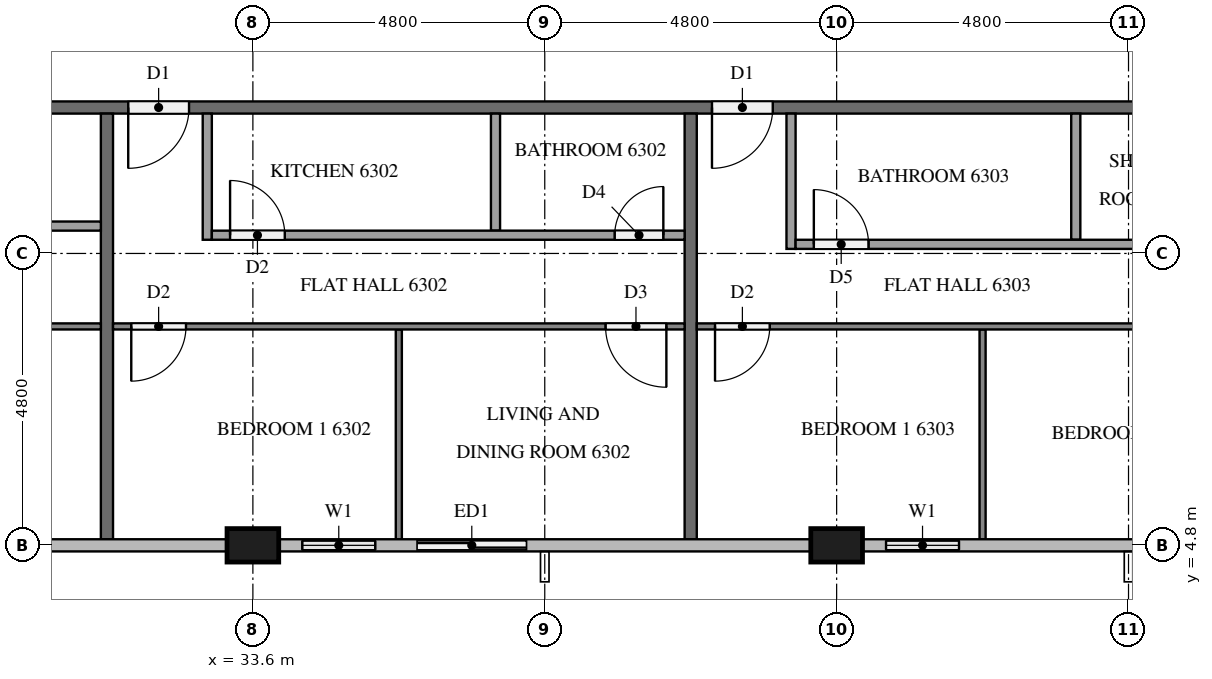
"""IFC4 building model, lengths in metres.
Left out: names, types, materials, properties, quantities, classifications, styles, units other than length and angle.
Written with IfcOpenShell. Run it as: python <this file> out.ifc"""

import sys

from ifc_helpers import new_model, si_unit, direction, frame, frame_2d, origin, origin_2d, place, context, subcontext, project, spatial, rectangle, extrude, element, fill, save


model = new_model("IFC4")
c1 = context("Model", 3, precision=1e-05, world=origin(), true_north=direction((0.0, 1.0)))
c2 = subcontext(c1, "Body", "Model", "MODEL_VIEW")
j1 = project(units=[si_unit("LENGTHUNIT", "METRE"), si_unit("PLANEANGLEUNIT", "RADIAN")], contexts=[c1])
p1 = place(None, origin())
s1 = spatial("IfcSite", under=j1, at=p1, CompositionType="ELEMENT")
p2 = place(p1, origin())
s2 = spatial("IfcBuilding", under=s1, at=p2, CompositionType="ELEMENT")
p3 = place(p2, frame((0.0, 0.0, 242.2)))
s3 = spatial("IfcBuildingStorey", under=s2, at=p3, CompositionType="ELEMENT", Elevation=242.2)
for number, where, z_axis, x_axis in (
    (1, (33.6, 4.8, 0.0), (0.0, 0.0, 1.0), (1.0, 0.0, 0.0)),
    (2, (43.2, 4.8, 0.0), (0.0, 0.0, 1.0), (1.0, 0.0, 0.0)),
):
    element("IfcColumn", number, at=place(p3, frame(where, z_axis=z_axis, x_axis=x_axis)), inside=s3, PredefinedType="COLUMN", context=c2, shape_type="SweptSolid", body=[
        extrude(rectangle(XDim=0.85, YDim=0.55, at=origin_2d()), origin(), (0.0, 0.0, 1.0), 3.2),
    ])
p4 = place(p3, frame((34.025, 4.8, 0.0), z_axis=(0.0, 0.0, 1.0), x_axis=(1.0, 0.0, 0.0)))
e3 = element("IfcWall", 3, at=p4, inside=s3, PredefinedType="SOLIDWALL", context=c2, shape_type="SweptSolid", body=[
    extrude(rectangle(XDim=4.375, YDim=0.15, at=frame_2d((2.188, 0.0))), origin(), (0.0, 0.0, 1.0), 3.2),
])
p5 = place(p4, frame((0.387, 0.0, 0.9)))
e4 = element("IfcOpeningElement", 4, at=p5, cuts=e3, PredefinedType="OPENING", context=c2, shape_type="SweptSolid", body=[
    extrude(rectangle(XDim=1.2, YDim=1.4, at=frame_2d((0.6, 0.7))), frame((0.0, 0.085, 0.0), z_axis=(0.0, -1.0, 0.0), x_axis=(1.0, 0.0, 0.0)), (0.0, 0.0, 1.0), 0.17),
])
p6 = place(p4, frame((2.275, 0.0, 0.0)))
e5 = element("IfcOpeningElement", 5, at=p6, cuts=e3, PredefinedType="OPENING", context=c2, shape_type="SweptSolid", body=[
    extrude(rectangle(XDim=1.8, YDim=2.4, at=frame_2d((0.9, 1.2))), frame((0.0, 0.085, 0.0), z_axis=(0.0, -1.0, 0.0), x_axis=(1.0, 0.0, 0.0)), (0.0, 0.0, 1.0), 0.17),
])
p7 = place(p3, frame((43.625, 4.8, 0.0), z_axis=(0.0, 0.0, 1.0), x_axis=(1.0, 0.0, 0.0)))
e6 = element("IfcWall", 6, at=p7, inside=s3, PredefinedType="SOLIDWALL", context=c2, shape_type="SweptSolid", body=[
    extrude(rectangle(XDim=1.975, YDim=0.15, at=frame_2d((0.988, 0.0))), origin(), (0.0, 0.0, 1.0), 3.2),
])
p8 = place(p7, frame((0.387, 0.0, 0.9)))
e7 = element("IfcOpeningElement", 7, at=p8, cuts=e6, PredefinedType="OPENING", context=c2, shape_type="SweptSolid", body=[
    extrude(rectangle(XDim=1.2, YDim=1.4, at=frame_2d((0.6, 0.7))), frame((0.0, 0.085, 0.0), z_axis=(0.0, -1.0, 0.0), x_axis=(1.0, 0.0, 0.0)), (0.0, 0.0, 1.0), 0.17),
])
p9 = place(p3, frame((50.5, 12.0, 0.0), z_axis=(0.0, 0.0, 1.0), x_axis=(-1.0, 0.0, 0.0)))
e8 = element("IfcWall", 8, at=p9, inside=s3, PredefinedType="PARTITIONING", context=c2, shape_type="SweptSolid", body=[
    extrude(rectangle(XDim=38.6, YDim=0.2, at=frame_2d((19.3, 0.0))), origin(), (0.0, 0.0, 1.0), 3.2),
])
p10 = place(p9, frame((37.1, 0.0, 0.0)))
e9 = element("IfcOpeningElement", 9, at=p10, cuts=e8, PredefinedType="OPENING", context=c2, shape_type="SweptSolid", body=[
    extrude(rectangle(XDim=1.1, YDim=2.1, at=frame_2d((0.55, 1.05))), frame((0.0, 0.11, 0.0), z_axis=(0.0, -1.0, 0.0), x_axis=(1.0, 0.0, 0.0)), (0.0, 0.0, 1.0), 0.22),
])
p11 = place(p9, frame((17.95, 0.0, 0.0)))
e10 = element("IfcOpeningElement", 10, at=p11, cuts=e8, PredefinedType="OPENING", context=c2, shape_type="SweptSolid", body=[
    extrude(rectangle(XDim=1.0, YDim=2.1, at=frame_2d((0.5, 1.05))), frame((0.0, 0.11, 0.0), z_axis=(0.0, -1.0, 0.0), x_axis=(1.0, 0.0, 0.0)), (0.0, 0.0, 1.0), 0.22),
])
p12 = place(p9, frame((8.35, 0.0, 0.0)))
e11 = element("IfcOpeningElement", 11, at=p12, cuts=e8, PredefinedType="OPENING", context=c2, shape_type="SweptSolid", body=[
    extrude(rectangle(XDim=1.0, YDim=2.1, at=frame_2d((0.5, 1.05))), frame((0.0, 0.11, 0.0), z_axis=(0.0, -1.0, 0.0), x_axis=(1.0, 0.0, 0.0)), (0.0, 0.0, 1.0), 0.22),
])
for number, where, z_axis, x_axis in (
    (12, (31.2, 11.9, 0.0), (0.0, 0.0, 1.0), (0.0, -1.0, 0.0)),
    (13, (40.8, 11.9, 0.0), (0.0, 0.0, 1.0), (0.0, -1.0, 0.0)),
):
    element("IfcWall", number, at=place(p3, frame(where, z_axis=z_axis, x_axis=x_axis)), inside=s3, PredefinedType="PARTITIONING", context=c2, shape_type="SweptSolid", body=[
        extrude(rectangle(XDim=7.0, YDim=0.2, at=frame_2d((3.5, 0.0))), origin(), (0.0, 0.0, 1.0), 3.2),
    ])
p13 = place(p3, frame((31.1, 8.4, 0.0), z_axis=(0.0, 0.0, 1.0), x_axis=(-1.0, 0.0, 0.0)))
e14 = element("IfcWall", 14, at=p13, inside=s3, PredefinedType="PARTITIONING", context=c2, shape_type="SweptSolid", body=[
    extrude(rectangle(XDim=19.0, YDim=0.1, at=frame_2d((9.5, 0.0))), origin(), (0.0, 0.0, 1.0), 3.2),
])
p14 = place(p13, frame((14.65, 0.0, 0.0)))
e15 = element("IfcOpeningElement", 15, at=p14, cuts=e14, PredefinedType="OPENING", context=c2, shape_type="SweptSolid", body=[
    extrude(rectangle(XDim=0.9, YDim=2.1, at=frame_2d((0.45, 1.05))), frame((0.0, 0.06, 0.0), z_axis=(0.0, -1.0, 0.0), x_axis=(1.0, 0.0, 0.0)), (0.0, 0.0, 1.0), 0.12),
])
p15 = place(p13, frame((12.95, 0.0, 0.0)))
e16 = element("IfcOpeningElement", 16, at=p15, cuts=e14, PredefinedType="OPENING", context=c2, shape_type="SweptSolid", body=[
    extrude(rectangle(XDim=1.0, YDim=2.1, at=frame_2d((0.5, 1.05))), frame((0.0, 0.06, 0.0), z_axis=(0.0, -1.0, 0.0), x_axis=(1.0, 0.0, 0.0)), (0.0, 0.0, 1.0), 0.12),
])
p16 = place(p13, frame((5.05, 0.0, 0.0)))
e17 = element("IfcOpeningElement", 17, at=p16, cuts=e14, PredefinedType="OPENING", context=c2, shape_type="SweptSolid", body=[
    extrude(rectangle(XDim=0.9, YDim=2.1, at=frame_2d((0.45, 1.05))), frame((0.0, 0.06, 0.0), z_axis=(0.0, -1.0, 0.0), x_axis=(1.0, 0.0, 0.0)), (0.0, 0.0, 1.0), 0.12),
])
p17 = place(p13, frame((3.45, 0.0, 0.0)))
e18 = element("IfcOpeningElement", 18, at=p17, cuts=e14, PredefinedType="OPENING", context=c2, shape_type="SweptSolid", body=[
    extrude(rectangle(XDim=0.9, YDim=2.1, at=frame_2d((0.45, 1.05))), frame((0.0, 0.06, 0.0), z_axis=(0.0, -1.0, 0.0), x_axis=(1.0, 0.0, 0.0)), (0.0, 0.0, 1.0), 0.12),
])
p18 = place(p3, frame((13.725, 10.05, 0.0), z_axis=(0.0, 0.0, 1.0), x_axis=(1.0, 0.0, 0.0)))
e19 = element("IfcWall", 19, at=p18, inside=s3, PredefinedType="PARTITIONING", context=c2, shape_type="SweptSolid", body=[
    extrude(rectangle(XDim=17.375, YDim=0.15, at=frame_2d((8.688, 0.0))), origin(), (0.0, 0.0, 1.0), 3.2),
])
p19 = place(p18, frame((2.133, 0.0, 0.0)))
e20 = element("IfcOpeningElement", 20, at=p19, cuts=e19, PredefinedType="OPENING", context=c2, shape_type="SweptSolid", body=[
    extrude(rectangle(XDim=0.8, YDim=2.1, at=frame_2d((0.4, 1.05))), frame((0.0, 0.085, 0.0), z_axis=(0.0, -1.0, 0.0), x_axis=(1.0, 0.0, 0.0)), (0.0, 0.0, 1.0), 0.17),
])
p20 = place(p18, frame((3.583, 0.0, 0.0)))
e21 = element("IfcOpeningElement", 21, at=p20, cuts=e19, PredefinedType="OPENING", context=c2, shape_type="SweptSolid", body=[
    extrude(rectangle(XDim=0.8, YDim=2.1, at=frame_2d((0.4, 1.05))), frame((0.0, 0.085, 0.0), z_axis=(0.0, -1.0, 0.0), x_axis=(1.0, 0.0, 0.0)), (0.0, 0.0, 1.0), 0.17),
])
p21 = place(p18, frame((9.635, 0.0, 0.0)))
e22 = element("IfcOpeningElement", 22, at=p21, cuts=e19, PredefinedType="OPENING", context=c2, shape_type="SweptSolid", body=[
    extrude(rectangle(XDim=0.9, YDim=2.1, at=frame_2d((0.45, 1.05))), frame((0.0, 0.085, 0.0), z_axis=(0.0, -1.0, 0.0), x_axis=(1.0, 0.0, 0.0)), (0.0, 0.0, 1.0), 0.17),
])
p22 = place(p18, frame((11.184, 0.0, 0.0)))
e23 = element("IfcOpeningElement", 23, at=p22, cuts=e19, PredefinedType="OPENING", context=c2, shape_type="SweptSolid", body=[
    extrude(rectangle(XDim=0.9, YDim=2.1, at=frame_2d((0.45, 1.05))), frame((0.0, 0.085, 0.0), z_axis=(0.0, -1.0, 0.0), x_axis=(1.0, 0.0, 0.0)), (0.0, 0.0, 1.0), 0.17),
])
p23 = place(p3, frame((36.0, 8.35, 0.0), z_axis=(0.0, 0.0, 1.0), x_axis=(0.0, -1.0, 0.0)))
e24 = element("IfcWall", 24, at=p23, inside=s3, PredefinedType="PARTITIONING", context=c2, shape_type="SweptSolid", body=[
    extrude(rectangle(XDim=3.45, YDim=0.1, at=frame_2d((1.725, 0.0))), origin(), (0.0, 0.0, 1.0), 3.2),
])
p24 = place(p3, frame((40.7, 8.4, 0.0), z_axis=(0.0, 0.0, 1.0), x_axis=(-1.0, 0.0, 0.0)))
e25 = element("IfcWall", 25, at=p24, inside=s3, PredefinedType="PARTITIONING", context=c2, shape_type="SweptSolid", body=[
    extrude(rectangle(XDim=9.4, YDim=0.1, at=frame_2d((4.7, 0.0))), origin(), (0.0, 0.0, 1.0), 3.2),
])
p25 = place(p24, frame((8.2, 0.0, 0.0)))
e26 = element("IfcOpeningElement", 26, at=p25, cuts=e25, PredefinedType="OPENING", context=c2, shape_type="SweptSolid", body=[
    extrude(rectangle(XDim=0.9, YDim=2.1, at=frame_2d((0.45, 1.05))), frame((0.0, 0.06, 0.0), z_axis=(0.0, -1.0, 0.0), x_axis=(1.0, 0.0, 0.0)), (0.0, 0.0, 1.0), 0.12),
])
p26 = place(p24, frame((0.3, 0.0, 0.0)))
e27 = element("IfcOpeningElement", 27, at=p26, cuts=e25, PredefinedType="OPENING", context=c2, shape_type="SweptSolid", body=[
    extrude(rectangle(XDim=1.0, YDim=2.1, at=frame_2d((0.5, 1.05))), frame((0.0, 0.06, 0.0), z_axis=(0.0, -1.0, 0.0), x_axis=(1.0, 0.0, 0.0)), (0.0, 0.0, 1.0), 0.12),
])
p27 = place(p3, frame((37.59, 11.9, 0.0), z_axis=(0.0, 0.0, 1.0), x_axis=(0.0, -1.0, 0.0)))
e28 = element("IfcWall", 28, at=p27, inside=s3, PredefinedType="PARTITIONING", context=c2, shape_type="SweptSolid", body=[
    extrude(rectangle(XDim=1.925, YDim=0.15, at=frame_2d((0.962, 0.0))), origin(), (0.0, 0.0, 1.0), 3.2),
])
p28 = place(p3, frame((32.85, 11.9, 0.0), z_axis=(0.0, 0.0, 1.0), x_axis=(0.0, -1.0, 0.0)))
e29 = element("IfcWall", 29, at=p28, inside=s3, PredefinedType="PARTITIONING", context=c2, shape_type="SweptSolid", body=[
    extrude(rectangle(XDim=2.075, YDim=0.15, at=frame_2d((1.038, 0.0))), origin(), (0.0, 0.0, 1.0), 3.2),
])
p29 = place(p3, frame((32.925, 9.9, 0.0), z_axis=(0.0, 0.0, 1.0), x_axis=(1.0, 0.0, 0.0)))
e30 = element("IfcWall", 30, at=p29, inside=s3, PredefinedType="PARTITIONING", context=c2, shape_type="SweptSolid", body=[
    extrude(rectangle(XDim=7.775, YDim=0.15, at=frame_2d((3.887, 0.0))), origin(), (0.0, 0.0, 1.0), 3.2),
])
p30 = place(p29, frame((0.3, 0.0, 0.0)))
e31 = element("IfcOpeningElement", 31, at=p30, cuts=e30, PredefinedType="OPENING", context=c2, shape_type="SweptSolid", body=[
    extrude(rectangle(XDim=0.9, YDim=2.1, at=frame_2d((0.45, 1.05))), frame((0.0, 0.085, 0.0), z_axis=(0.0, -1.0, 0.0), x_axis=(1.0, 0.0, 0.0)), (0.0, 0.0, 1.0), 0.17),
])
p31 = place(p29, frame((6.625, 0.0, 0.0)))
e32 = element("IfcOpeningElement", 32, at=p31, cuts=e30, PredefinedType="OPENING", context=c2, shape_type="SweptSolid", body=[
    extrude(rectangle(XDim=0.8, YDim=2.1, at=frame_2d((0.4, 1.05))), frame((0.0, 0.085, 0.0), z_axis=(0.0, -1.0, 0.0), x_axis=(1.0, 0.0, 0.0)), (0.0, 0.0, 1.0), 0.17),
])
p32 = place(p3, frame((45.6, 8.35, 0.0), z_axis=(0.0, 0.0, 1.0), x_axis=(0.0, -1.0, 0.0)))
e33 = element("IfcWall", 33, at=p32, inside=s3, PredefinedType="PARTITIONING", context=c2, shape_type="SweptSolid", body=[
    extrude(rectangle(XDim=3.45, YDim=0.1, at=frame_2d((1.725, 0.0))), origin(), (0.0, 0.0, 1.0), 3.2),
])
p33 = place(p3, frame((57.178, 8.4, 0.0), z_axis=(0.0, 0.0, 1.0), x_axis=(-1.0, 0.0, 0.0)))
e34 = element("IfcWall", 34, at=p33, inside=s3, PredefinedType="PARTITIONING", context=c2, shape_type="SweptSolid", body=[
    extrude(rectangle(XDim=16.279, YDim=0.1, at=frame_2d((8.139, 0.0))), origin(), (0.0, 0.0, 1.0), 3.2),
])
p34 = place(p33, frame((15.079, 0.0, 0.0)))
e35 = element("IfcOpeningElement", 35, at=p34, cuts=e34, PredefinedType="OPENING", context=c2, shape_type="SweptSolid", body=[
    extrude(rectangle(XDim=0.9, YDim=2.1, at=frame_2d((0.45, 1.05))), frame((0.0, 0.06, 0.0), z_axis=(0.0, -1.0, 0.0), x_axis=(1.0, 0.0, 0.0)), (0.0, 0.0, 1.0), 0.12),
])
p35 = place(p33, frame((7.128, 0.0, 0.0)))
e36 = element("IfcOpeningElement", 36, at=p35, cuts=e34, PredefinedType="OPENING", context=c2, shape_type="SweptSolid", body=[
    extrude(rectangle(XDim=0.9, YDim=2.1, at=frame_2d((0.45, 1.05))), frame((0.0, 0.06, 0.0), z_axis=(0.0, -1.0, 0.0), x_axis=(1.0, 0.0, 0.0)), (0.0, 0.0, 1.0), 0.12),
])
p36 = place(p33, frame((5.428, 0.0, 0.0)))
e37 = element("IfcOpeningElement", 37, at=p36, cuts=e34, PredefinedType="OPENING", context=c2, shape_type="SweptSolid", body=[
    extrude(rectangle(XDim=1.0, YDim=2.1, at=frame_2d((0.5, 1.05))), frame((0.0, 0.06, 0.0), z_axis=(0.0, -1.0, 0.0), x_axis=(1.0, 0.0, 0.0)), (0.0, 0.0, 1.0), 0.12),
])
p37 = place(p3, frame((47.133, 11.9, 0.0), z_axis=(0.0, 0.0, 1.0), x_axis=(0.0, -1.0, 0.0)))
e38 = element("IfcWall", 38, at=p37, inside=s3, PredefinedType="PARTITIONING", context=c2, shape_type="SweptSolid", body=[
    extrude(rectangle(XDim=2.075, YDim=0.15, at=frame_2d((1.038, 0.0))), origin(), (0.0, 0.0, 1.0), 3.2),
])
p38 = place(p3, frame((42.45, 11.9, 0.0), z_axis=(0.0, 0.0, 1.0), x_axis=(0.0, -1.0, 0.0)))
e39 = element("IfcWall", 39, at=p38, inside=s3, PredefinedType="PARTITIONING", context=c2, shape_type="SweptSolid", body=[
    extrude(rectangle(XDim=2.225, YDim=0.15, at=frame_2d((1.112, 0.0))), origin(), (0.0, 0.0, 1.0), 3.2),
])
p39 = place(p3, frame((42.525, 9.75, 0.0), z_axis=(0.0, 0.0, 1.0), x_axis=(1.0, 0.0, 0.0)))
e40 = element("IfcWall", 40, at=p39, inside=s3, PredefinedType="PARTITIONING", context=c2, shape_type="SweptSolid", body=[
    extrude(rectangle(XDim=14.725, YDim=0.15, at=frame_2d((7.363, 0.0))), origin(), (0.0, 0.0, 1.0), 3.2),
])
p40 = place(p39, frame((0.3, 0.0, 0.0)))
e41 = element("IfcOpeningElement", 41, at=p40, cuts=e40, PredefinedType="OPENING", context=c2, shape_type="SweptSolid", body=[
    extrude(rectangle(XDim=0.9, YDim=2.1, at=frame_2d((0.45, 1.05))), frame((0.0, 0.085, 0.0), z_axis=(0.0, -1.0, 0.0), x_axis=(1.0, 0.0, 0.0)), (0.0, 0.0, 1.0), 0.17),
])
p41 = place(p39, frame((6.938, 0.0, 0.0)))
e42 = element("IfcOpeningElement", 42, at=p41, cuts=e40, PredefinedType="OPENING", context=c2, shape_type="SweptSolid", body=[
    extrude(rectangle(XDim=0.8, YDim=2.1, at=frame_2d((0.4, 1.05))), frame((0.0, 0.085, 0.0), z_axis=(0.0, -1.0, 0.0), x_axis=(1.0, 0.0, 0.0)), (0.0, 0.0, 1.0), 0.17),
])
p42 = place(p39, frame((8.388, 0.0, 0.0)))
e43 = element("IfcOpeningElement", 43, at=p42, cuts=e40, PredefinedType="OPENING", context=c2, shape_type="SweptSolid", body=[
    extrude(rectangle(XDim=0.9, YDim=2.1, at=frame_2d((0.45, 1.05))), frame((0.0, 0.085, 0.0), z_axis=(0.0, -1.0, 0.0), x_axis=(1.0, 0.0, 0.0)), (0.0, 0.0, 1.0), 0.17),
])
p43 = place(p5, origin())
e44 = element("IfcWindow", 44, at=p43, inside=s3, PartitioningType="SINGLE_PANEL", PredefinedType="WINDOW", context=c2, shape_type="SweptSolid", body=[
    extrude(rectangle(XDim=1.2, YDim=1.4, at=frame_2d((0.6, 0.7))), frame((0.0, 0.03, 0.0), z_axis=(0.0, -1.0, 0.0), x_axis=(1.0, 0.0, 0.0)), (0.0, 0.0, 1.0), 0.06),
])
fill(e4, e44)
p44 = place(p6, origin())
e45 = element("IfcDoor", 45, at=p44, inside=s3, OperationType="SLIDING_TO_RIGHT", PredefinedType="DOOR", context=c2, shape_type="SweptSolid", body=[
    extrude(rectangle(XDim=1.8, YDim=2.4, at=frame_2d((0.9, 1.2))), frame((0.0, 0.025, 0.0), z_axis=(0.0, -1.0, 0.0), x_axis=(1.0, 0.0, 0.0)), (0.0, 0.0, 1.0), 0.05),
])
fill(e5, e45)
p45 = place(p8, origin())
e46 = element("IfcWindow", 46, at=p45, inside=s3, PartitioningType="SINGLE_PANEL", PredefinedType="WINDOW", context=c2, shape_type="SweptSolid", body=[
    extrude(rectangle(XDim=1.2, YDim=1.4, at=frame_2d((0.6, 0.7))), frame((0.0, 0.03, 0.0), z_axis=(0.0, -1.0, 0.0), x_axis=(1.0, 0.0, 0.0)), (0.0, 0.0, 1.0), 0.06),
])
fill(e7, e46)
p46 = place(p11, origin())
e47 = element("IfcDoor", 47, at=p46, inside=s3, OperationType="SINGLE_SWING_RIGHT", PredefinedType="DOOR", context=c2, shape_type="SweptSolid", body=[
    extrude(rectangle(XDim=1.0, YDim=2.1, at=frame_2d((0.5, 1.05))), frame((0.0, 0.025, 0.0), z_axis=(0.0, -1.0, 0.0), x_axis=(1.0, 0.0, 0.0)), (0.0, 0.0, 1.0), 0.05),
])
fill(e10, e47)
p47 = place(p12, origin())
e48 = element("IfcDoor", 48, at=p47, inside=s3, OperationType="SINGLE_SWING_RIGHT", PredefinedType="DOOR", context=c2, shape_type="SweptSolid", body=[
    extrude(rectangle(XDim=1.0, YDim=2.1, at=frame_2d((0.5, 1.05))), frame((0.0, 0.025, 0.0), z_axis=(0.0, -1.0, 0.0), x_axis=(1.0, 0.0, 0.0)), (0.0, 0.0, 1.0), 0.05),
])
fill(e11, e48)
p48 = place(p25, origin())
e49 = element("IfcDoor", 49, at=p48, inside=s3, OperationType="SINGLE_SWING_RIGHT", PredefinedType="DOOR", context=c2, shape_type="SweptSolid", body=[
    extrude(rectangle(XDim=0.9, YDim=2.1, at=frame_2d((0.45, 1.05))), frame((0.0, 0.025, 0.0), z_axis=(0.0, -1.0, 0.0), x_axis=(1.0, 0.0, 0.0)), (0.0, 0.0, 1.0), 0.05),
])
fill(e26, e49)
p49 = place(p26, origin())
e50 = element("IfcDoor", 50, at=p49, inside=s3, OperationType="SINGLE_SWING_LEFT", PredefinedType="DOOR", context=c2, shape_type="SweptSolid", body=[
    extrude(rectangle(XDim=1.0, YDim=2.1, at=frame_2d((0.5, 1.05))), frame((0.0, 0.025, 0.0), z_axis=(0.0, -1.0, 0.0), x_axis=(1.0, 0.0, 0.0)), (0.0, 0.0, 1.0), 0.05),
])
fill(e27, e50)
p50 = place(p30, origin())
e51 = element("IfcDoor", 51, at=p50, inside=s3, OperationType="SINGLE_SWING_LEFT", PredefinedType="DOOR", context=c2, shape_type="SweptSolid", body=[
    extrude(rectangle(XDim=0.9, YDim=2.1, at=frame_2d((0.45, 1.05))), frame((0.0, 0.025, 0.0), z_axis=(0.0, -1.0, 0.0), x_axis=(1.0, 0.0, 0.0)), (0.0, 0.0, 1.0), 0.05),
])
fill(e31, e51)
p51 = place(p31, origin())
e52 = element("IfcDoor", 52, at=p51, inside=s3, OperationType="SINGLE_SWING_RIGHT", PredefinedType="DOOR", context=c2, shape_type="SweptSolid", body=[
    extrude(rectangle(XDim=0.8, YDim=2.1, at=frame_2d((0.4, 1.05))), frame((0.0, 0.025, 0.0), z_axis=(0.0, -1.0, 0.0), x_axis=(1.0, 0.0, 0.0)), (0.0, 0.0, 1.0), 0.05),
])
fill(e32, e52)
p52 = place(p34, origin())
e53 = element("IfcDoor", 53, at=p52, inside=s3, OperationType="SINGLE_SWING_RIGHT", PredefinedType="DOOR", context=c2, shape_type="SweptSolid", body=[
    extrude(rectangle(XDim=0.9, YDim=2.1, at=frame_2d((0.45, 1.05))), frame((0.0, 0.025, 0.0), z_axis=(0.0, -1.0, 0.0), x_axis=(1.0, 0.0, 0.0)), (0.0, 0.0, 1.0), 0.05),
])
fill(e35, e53)
p53 = place(p40, origin())
e54 = element("IfcDoor", 54, at=p53, inside=s3, OperationType="SINGLE_SWING_LEFT", PredefinedType="DOOR", context=c2, shape_type="SweptSolid", body=[
    extrude(rectangle(XDim=0.9, YDim=2.1, at=frame_2d((0.45, 1.05))), frame((0.0, 0.025, 0.0), z_axis=(0.0, -1.0, 0.0), x_axis=(1.0, 0.0, 0.0)), (0.0, 0.0, 1.0), 0.05),
])
fill(e41, e54)
save(model, sys.argv[1])
